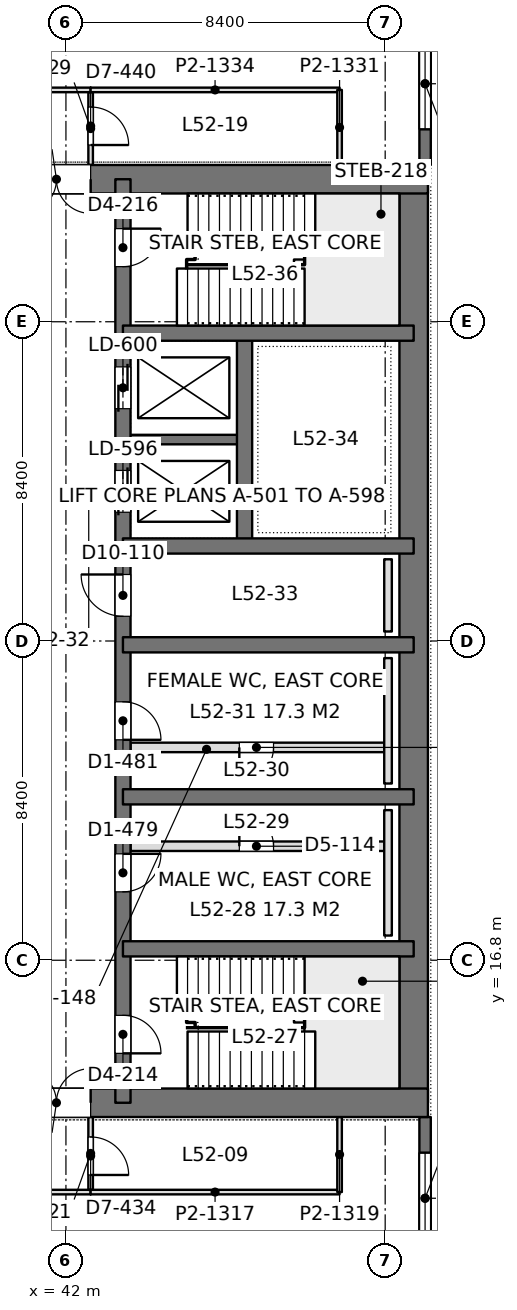
"""IFC4 building model, lengths in metres.
Left out: names, types, materials, properties, quantities, classifications, styles, units other than length and angle.
Written with IfcOpenShell. Run it as: python <this file> out.ifc"""

import sys

from ifc_helpers import new_model, si_unit, direction, frame, frame_2d, origin, place, context, subcontext, project, spatial, rectangle, extrude, element, fill, save


model = new_model("IFC4")
c1 = context("Model", 3, precision=1e-05, world=origin(), true_north=direction((0.0, 1.0)))
c2 = subcontext(c1, "Body", "Model", "MODEL_VIEW")
j1 = project(units=[si_unit("LENGTHUNIT", "METRE"), si_unit("PLANEANGLEUNIT", "RADIAN")], contexts=[c1])
p1 = place(None, origin())
s1 = spatial("IfcSite", under=j1, at=p1, CompositionType="ELEMENT")
p2 = place(p1, origin())
s2 = spatial("IfcBuilding", under=s1, at=p2, CompositionType="ELEMENT")
p3 = place(p2, frame((0.0, 0.0, 228.0)))
s3 = spatial("IfcBuildingStorey", under=s2, at=p3, CompositionType="ELEMENT", Elevation=228.0)
p4 = place(p3, frame((33.675, 13.05, 0.0), z_axis=(0.0, 0.0, 1.0), x_axis=(1.0, 0.0, 0.0)))
e1 = element("IfcWall", 1, at=p4, inside=s3, PredefinedType="SHEAR", context=c2, shape_type="SweptSolid", body=[
    extrude(rectangle(XDim=17.85, YDim=0.75, at=frame_2d((8.925, 0.0))), origin(), (0.0, 0.0, 1.0), 4.2),
])
p5 = place(p4, frame((7.175, 0.0, 0.0)))
e2 = element("IfcOpeningElement", 2, at=p5, cuts=e1, PredefinedType="OPENING", context=c2, shape_type="SweptSolid", body=[
    extrude(rectangle(XDim=1.8, YDim=2.4, at=frame_2d((0.9, 1.2))), frame((0.0, 0.385, 0.0), z_axis=(0.0, -1.0, 0.0), x_axis=(1.0, 0.0, 0.0)), (0.0, 0.0, 1.0), 0.77),
])
p6 = place(p3, frame((33.675, 37.35, 0.0), z_axis=(0.0, 0.0, 1.0), x_axis=(1.0, 0.0, 0.0)))
e3 = element("IfcWall", 3, at=p6, inside=s3, PredefinedType="SHEAR", context=c2, shape_type="SweptSolid", body=[
    extrude(rectangle(XDim=17.85, YDim=0.75, at=frame_2d((8.925, 0.0))), origin(), (0.0, 0.0, 1.0), 4.2),
])
p7 = place(p6, frame((7.175, 0.0, 0.0)))
e4 = element("IfcOpeningElement", 4, at=p7, cuts=e3, PredefinedType="OPENING", context=c2, shape_type="SweptSolid", body=[
    extrude(rectangle(XDim=1.8, YDim=2.4, at=frame_2d((0.9, 1.2))), frame((0.0, 0.385, 0.0), z_axis=(0.0, -1.0, 0.0), x_axis=(1.0, 0.0, 0.0)), (0.0, 0.0, 1.0), 0.77),
])
p8 = place(p3, frame((51.15, 13.05, 0.0), z_axis=(0.0, 0.0, 1.0), x_axis=(0.0, 1.0, 0.0)))
e5 = element("IfcWall", 5, at=p8, inside=s3, PredefinedType="SHEAR", context=c2, shape_type="SweptSolid", body=[
    extrude(rectangle(XDim=24.3, YDim=0.75, at=frame_2d((12.15, 0.0))), origin(), (0.0, 0.0, 1.0), 4.2),
])
p9 = place(p3, frame((43.5, 13.05, 0.0), z_axis=(0.0, 0.0, 1.0), x_axis=(0.0, 1.0, 0.0)))
e6 = element("IfcWall", 6, at=p9, inside=s3, PredefinedType="SHEAR", context=c2, shape_type="SweptSolid", body=[
    extrude(rectangle(XDim=24.3, YDim=0.4, at=frame_2d((12.15, 0.0))), origin(), (0.0, 0.0, 1.0), 4.2),
])
p10 = place(p9, frame((1.3, 0.0, 0.0)))
e7 = element("IfcOpeningElement", 7, at=p10, cuts=e6, PredefinedType="OPENING", context=c2, shape_type="SweptSolid", body=[
    extrude(rectangle(XDim=1.0, YDim=2.2, at=frame_2d((0.5, 1.1))), frame((0.0, 0.21, 0.0), z_axis=(0.0, -1.0, 0.0), x_axis=(1.0, 0.0, 0.0)), (0.0, 0.0, 1.0), 0.42),
])
p11 = place(p9, frame((22.0, 0.0, 0.0)))
e8 = element("IfcOpeningElement", 8, at=p11, cuts=e6, PredefinedType="OPENING", context=c2, shape_type="SweptSolid", body=[
    extrude(rectangle(XDim=1.0, YDim=2.2, at=frame_2d((0.5, 1.1))), frame((0.0, 0.21, 0.0), z_axis=(0.0, -1.0, 0.0), x_axis=(1.0, 0.0, 0.0)), (0.0, 0.0, 1.0), 0.42),
])
p12 = place(p9, frame((5.55, 0.0, 0.0)))
e9 = element("IfcOpeningElement", 9, at=p12, cuts=e6, PredefinedType="OPENING", context=c2, shape_type="SweptSolid", body=[
    extrude(rectangle(XDim=1.0, YDim=2.2, at=frame_2d((0.5, 1.1))), frame((0.0, 0.21, 0.0), z_axis=(0.0, -1.0, 0.0), x_axis=(1.0, 0.0, 0.0)), (0.0, 0.0, 1.0), 0.42),
])
p13 = place(p9, frame((9.55, 0.0, 0.0)))
e10 = element("IfcOpeningElement", 10, at=p13, cuts=e6, PredefinedType="OPENING", context=c2, shape_type="SweptSolid", body=[
    extrude(rectangle(XDim=1.0, YDim=2.2, at=frame_2d((0.5, 1.1))), frame((0.0, 0.21, 0.0), z_axis=(0.0, -1.0, 0.0), x_axis=(1.0, 0.0, 0.0)), (0.0, 0.0, 1.0), 0.42),
])
p14 = place(p9, frame((12.8, 0.0, 0.0)))
e11 = element("IfcOpeningElement", 11, at=p14, cuts=e6, PredefinedType="OPENING", context=c2, shape_type="SweptSolid", body=[
    extrude(rectangle(XDim=1.1, YDim=2.2, at=frame_2d((0.55, 1.1))), frame((0.0, 0.21, 0.0), z_axis=(0.0, -1.0, 0.0), x_axis=(1.0, 0.0, 0.0)), (0.0, 0.0, 1.0), 0.42),
])
p15 = place(p9, frame((15.538, 0.0, 0.0)))
e12 = element("IfcOpeningElement", 12, at=p15, cuts=e6, PredefinedType="OPENING", context=c2, shape_type="SweptSolid", body=[
    extrude(rectangle(XDim=1.1, YDim=2.2, at=frame_2d((0.55, 1.1))), frame((0.0, 0.21, 0.0), z_axis=(0.0, -1.0, 0.0), x_axis=(1.0, 0.0, 0.0)), (0.0, 0.0, 1.0), 0.42),
])
p16 = place(p9, frame((18.262, 0.0, 0.0)))
e13 = element("IfcOpeningElement", 13, at=p16, cuts=e6, PredefinedType="OPENING", context=c2, shape_type="SweptSolid", body=[
    extrude(rectangle(XDim=1.1, YDim=2.2, at=frame_2d((0.55, 1.1))), frame((0.0, 0.21, 0.0), z_axis=(0.0, -1.0, 0.0), x_axis=(1.0, 0.0, 0.0)), (0.0, 0.0, 1.0), 0.42),
])
for number, where, z_axis, x_axis in (
    (14, (51.15, 17.1, 0.0), (0.0, 0.0, 1.0), (-1.0, 0.0, 0.0)),
    (15, (51.15, 21.1, 0.0), (0.0, 0.0, 1.0), (-1.0, 0.0, 0.0)),
    (16, (51.15, 25.1, 0.0), (0.0, 0.0, 1.0), (-1.0, 0.0, 0.0)),
    (17, (51.15, 27.7, 0.0), (0.0, 0.0, 1.0), (-1.0, 0.0, 0.0)),
    (18, (51.15, 33.3, 0.0), (0.0, 0.0, 1.0), (-1.0, 0.0, 0.0)),
):
    element("IfcWall", number, at=place(p3, frame(where, z_axis=z_axis, x_axis=x_axis)), inside=s3, PredefinedType="SHEAR", context=c2, shape_type="SweptSolid", body=[
        extrude(rectangle(XDim=7.65, YDim=0.4, at=frame_2d((3.825, 0.0))), origin(), (0.0, 0.0, 1.0), 4.2),
    ])
p17 = place(p3, frame((46.7, 27.7, 0.0), z_axis=(0.0, 0.0, 1.0), x_axis=(0.0, 1.0, 0.0)))
e19 = element("IfcWall", 19, at=p17, inside=s3, PredefinedType="SHEAR", context=c2, shape_type="SweptSolid", body=[
    extrude(rectangle(XDim=5.6, YDim=0.4, at=frame_2d((2.8, 0.0))), origin(), (0.0, 0.0, 1.0), 4.2),
])
p18 = place(p3, frame((46.7, 30.5, 0.0), z_axis=(0.0, 0.0, 1.0), x_axis=(-1.0, 0.0, 0.0)))
e20 = element("IfcWall", 20, at=p18, inside=s3, PredefinedType="SHEAR", context=c2, shape_type="SweptSolid", body=[
    extrude(rectangle(XDim=3.2, YDim=0.25, at=frame_2d((1.6, 0.0))), origin(), (0.0, 0.0, 1.0), 4.2),
])
p19 = place(p3, frame((51.45, 42.0, 0.0), z_axis=(0.0, 0.0, 1.0), x_axis=(0.0, -1.0, 0.0)))
e21 = element("IfcWall", 21, at=p19, inside=s3, PredefinedType="SOLIDWALL", context=c2, shape_type="SweptSolid", body=[
    extrude(rectangle(XDim=4.275, YDim=0.3, at=frame_2d((2.137, 0.0))), origin(), (0.0, 0.0, 1.0), 4.05),
])
p20 = place(p19, frame((0.938, 0.0, 0.9)))
e22 = element("IfcOpeningElement", 22, at=p20, cuts=e21, PredefinedType="OPENING", context=c2, shape_type="SweptSolid", body=[
    extrude(rectangle(XDim=2.4, YDim=1.9, at=frame_2d((1.2, 0.95))), frame((0.0, 0.16, 0.0), z_axis=(0.0, -1.0, 0.0), x_axis=(1.0, 0.0, 0.0)), (0.0, 0.0, 1.0), 0.32),
])
p21 = place(p3, frame((51.45, 12.675, 0.0), z_axis=(0.0, 0.0, 1.0), x_axis=(0.0, -1.0, 0.0)))
e23 = element("IfcWall", 23, at=p21, inside=s3, PredefinedType="SOLIDWALL", context=c2, shape_type="SweptSolid", body=[
    extrude(rectangle(XDim=4.275, YDim=0.3, at=frame_2d((2.138, 0.0))), origin(), (0.0, 0.0, 1.0), 4.05),
])
p22 = place(p21, frame((0.938, 0.0, 0.9)))
e24 = element("IfcOpeningElement", 24, at=p22, cuts=e23, PredefinedType="OPENING", context=c2, shape_type="SweptSolid", body=[
    extrude(rectangle(XDim=2.4, YDim=1.9, at=frame_2d((1.2, 0.95))), frame((0.0, 0.16, 0.0), z_axis=(0.0, -1.0, 0.0), x_axis=(1.0, 0.0, 0.0)), (0.0, 0.0, 1.0), 0.32),
])
p23 = place(p3, frame((7.748, 10.7, 0.0), z_axis=(0.0, 0.0, 1.0), x_axis=(1.0, 0.0, 0.0)))
e25 = element("IfcWall", 25, at=p23, inside=s3, PredefinedType="PARTITIONING", context=c2, shape_type="SweptSolid", body=[
    extrude(rectangle(XDim=34.904, YDim=0.12, at=frame_2d((17.452, 0.0))), origin(), (0.0, 0.0, 1.0), 3.55),
])
p24 = place(p23, frame((10.735, 0.0, 0.0)))
e26 = element("IfcOpeningElement", 26, at=p24, cuts=e25, PredefinedType="OPENING", context=c2, shape_type="SweptSolid", body=[
    extrude(rectangle(XDim=1.8, YDim=2.2, at=frame_2d((0.9, 1.1))), frame((0.0, 0.07, 0.0), z_axis=(0.0, -1.0, 0.0), x_axis=(1.0, 0.0, 0.0)), (0.0, 0.0, 1.0), 0.14),
])
p25 = place(p23, frame((22.369, 0.0, 0.0)))
e27 = element("IfcOpeningElement", 27, at=p25, cuts=e25, PredefinedType="OPENING", context=c2, shape_type="SweptSolid", body=[
    extrude(rectangle(XDim=1.8, YDim=2.2, at=frame_2d((0.9, 1.1))), frame((0.0, 0.07, 0.0), z_axis=(0.0, -1.0, 0.0), x_axis=(1.0, 0.0, 0.0)), (0.0, 0.0, 1.0), 0.14),
])
p26 = place(p3, frame((42.65, 10.758, 0.0), z_axis=(0.0, 0.0, 1.0), x_axis=(0.0, 1.0, 0.0)))
e28 = element("IfcWall", 28, at=p26, inside=s3, PredefinedType="PARTITIONING", context=c2, shape_type="SweptSolid", body=[
    extrude(rectangle(XDim=1.918, YDim=0.12, at=frame_2d((0.959, 0.0))), origin(), (0.0, 0.0, 1.0), 4.05),
])
p27 = place(p26, frame((0.392, 0.0, 0.0)))
e29 = element("IfcOpeningElement", 29, at=p27, cuts=e28, PredefinedType="OPENING", context=c2, shape_type="SweptSolid", body=[
    extrude(rectangle(XDim=1.0, YDim=2.4, at=frame_2d((0.5, 1.2))), frame((0.0, 0.07, 0.0), z_axis=(0.0, -1.0, 0.0), x_axis=(1.0, 0.0, 0.0)), (0.0, 0.0, 1.0), 0.14),
])
p28 = place(p3, frame((42.648, 10.7, 0.0), z_axis=(0.0, 0.0, 1.0), x_axis=(1.0, 0.0, 0.0)))
e30 = element("IfcWall", 30, at=p28, inside=s3, PredefinedType="PARTITIONING", context=c2, shape_type="SweptSolid", body=[
    extrude(rectangle(XDim=6.552, YDim=0.12, at=frame_2d((3.276, 0.0))), origin(), (0.0, 0.0, 1.0), 4.05),
])
p29 = place(p3, frame((49.2, 10.7, 0.0), z_axis=(0.0, 0.0, 1.0), x_axis=(0.0, 1.0, 0.0)))
e31 = element("IfcWall", 31, at=p29, inside=s3, PredefinedType="PARTITIONING", context=c2, shape_type="SweptSolid", body=[
    extrude(rectangle(XDim=1.976, YDim=0.12, at=frame_2d((0.988, 0.0))), origin(), (0.0, 0.0, 1.0), 4.05),
])
p30 = place(p3, frame((7.748, 39.7, 0.0), z_axis=(0.0, 0.0, 1.0), x_axis=(1.0, 0.0, 0.0)))
e32 = element("IfcWall", 32, at=p30, inside=s3, PredefinedType="PARTITIONING", context=c2, shape_type="SweptSolid", body=[
    extrude(rectangle(XDim=34.904, YDim=0.12, at=frame_2d((17.452, 0.0))), origin(), (0.0, 0.0, 1.0), 3.55),
])
p31 = place(p30, frame((10.735, 0.0, 0.0)))
e33 = element("IfcOpeningElement", 33, at=p31, cuts=e32, PredefinedType="OPENING", context=c2, shape_type="SweptSolid", body=[
    extrude(rectangle(XDim=1.8, YDim=2.2, at=frame_2d((0.9, 1.1))), frame((0.0, 0.07, 0.0), z_axis=(0.0, -1.0, 0.0), x_axis=(1.0, 0.0, 0.0)), (0.0, 0.0, 1.0), 0.14),
])
p32 = place(p30, frame((22.369, 0.0, 0.0)))
e34 = element("IfcOpeningElement", 34, at=p32, cuts=e32, PredefinedType="OPENING", context=c2, shape_type="SweptSolid", body=[
    extrude(rectangle(XDim=1.8, YDim=2.2, at=frame_2d((0.9, 1.1))), frame((0.0, 0.07, 0.0), z_axis=(0.0, -1.0, 0.0), x_axis=(1.0, 0.0, 0.0)), (0.0, 0.0, 1.0), 0.14),
])
p33 = place(p3, frame((42.65, 37.724, 0.0), z_axis=(0.0, 0.0, 1.0), x_axis=(0.0, 1.0, 0.0)))
e35 = element("IfcWall", 35, at=p33, inside=s3, PredefinedType="PARTITIONING", context=c2, shape_type="SweptSolid", body=[
    extrude(rectangle(XDim=1.918, YDim=0.12, at=frame_2d((0.959, 0.0))), origin(), (0.0, 0.0, 1.0), 4.05),
])
p34 = place(p33, frame((0.526, 0.0, 0.0)))
e36 = element("IfcOpeningElement", 36, at=p34, cuts=e35, PredefinedType="OPENING", context=c2, shape_type="SweptSolid", body=[
    extrude(rectangle(XDim=1.0, YDim=2.4, at=frame_2d((0.5, 1.2))), frame((0.0, 0.07, 0.0), z_axis=(0.0, -1.0, 0.0), x_axis=(1.0, 0.0, 0.0)), (0.0, 0.0, 1.0), 0.14),
])
p35 = place(p3, frame((42.648, 39.7, 0.0), z_axis=(0.0, 0.0, 1.0), x_axis=(1.0, 0.0, 0.0)))
e37 = element("IfcWall", 37, at=p35, inside=s3, PredefinedType="PARTITIONING", context=c2, shape_type="SweptSolid", body=[
    extrude(rectangle(XDim=6.552, YDim=0.12, at=frame_2d((3.276, 0.0))), origin(), (0.0, 0.0, 1.0), 3.69),
])
p36 = place(p3, frame((49.2, 37.724, 0.0), z_axis=(0.0, 0.0, 1.0), x_axis=(0.0, 1.0, 0.0)))
e38 = element("IfcWall", 38, at=p36, inside=s3, PredefinedType="PARTITIONING", context=c2, shape_type="SweptSolid", body=[
    extrude(rectangle(XDim=1.976, YDim=0.12, at=frame_2d((0.988, 0.0))), origin(), (0.0, 0.0, 1.0), 4.05),
])
p37 = place(p3, frame((43.7, 22.4, 0.0), z_axis=(0.0, 0.0, 1.0), x_axis=(1.0, 0.0, 0.0)))
e39 = element("IfcWall", 39, at=p37, inside=s3, PredefinedType="PARTITIONING", context=c2, shape_type="SweptSolid", body=[
    extrude(rectangle(XDim=6.675, YDim=0.25, at=frame_2d((3.337, 0.0))), origin(), (0.0, 0.0, 1.0), 4.0),
])
p38 = place(p37, frame((2.863, 0.0, 0.0)))
e40 = element("IfcOpeningElement", 40, at=p38, cuts=e39, PredefinedType="OPENING", context=c2, shape_type="SweptSolid", body=[
    extrude(rectangle(XDim=0.9, YDim=2.2, at=frame_2d((0.45, 1.1))), frame((0.0, 0.135, 0.0), z_axis=(0.0, -1.0, 0.0), x_axis=(1.0, 0.0, 0.0)), (0.0, 0.0, 1.0), 0.27),
])
p39 = place(p3, frame((43.7, 19.8, 0.0), z_axis=(0.0, 0.0, 1.0), x_axis=(1.0, 0.0, 0.0)))
e41 = element("IfcWall", 41, at=p39, inside=s3, PredefinedType="PARTITIONING", context=c2, shape_type="SweptSolid", body=[
    extrude(rectangle(XDim=6.675, YDim=0.25, at=frame_2d((3.337, 0.0))), origin(), (0.0, 0.0, 1.0), 4.0),
])
p40 = place(p39, frame((2.863, 0.0, 0.0)))
e42 = element("IfcOpeningElement", 42, at=p40, cuts=e41, PredefinedType="OPENING", context=c2, shape_type="SweptSolid", body=[
    extrude(rectangle(XDim=0.9, YDim=2.2, at=frame_2d((0.45, 1.1))), frame((0.0, 0.135, 0.0), z_axis=(0.0, -1.0, 0.0), x_axis=(1.0, 0.0, 0.0)), (0.0, 0.0, 1.0), 0.27),
])
for number, where, z_axis, x_axis in (
    (43, (50.475, 17.45, 0.0), (0.0, 0.0, 1.0), (0.0, 1.0, 0.0)),
    (44, (50.475, 21.45, 0.0), (0.0, 0.0, 1.0), (0.0, 1.0, 0.0)),
):
    element("IfcWall", number, at=place(p3, frame(where, z_axis=z_axis, x_axis=x_axis)), inside=s3, PredefinedType="PLUMBINGWALL", context=c2, shape_type="SweptSolid", body=[
        extrude(rectangle(XDim=3.3, YDim=0.2, at=frame_2d((1.65, 0.0))), origin(), (0.0, 0.0, 1.0), 1.2),
    ])
p41 = place(p3, frame((50.475, 25.45, 0.0), z_axis=(0.0, 0.0, 1.0), x_axis=(0.0, 1.0, 0.0)))
e45 = element("IfcWall", 45, at=p41, inside=s3, PredefinedType="PLUMBINGWALL", context=c2, shape_type="SweptSolid", body=[
    extrude(rectangle(XDim=1.9, YDim=0.2, at=frame_2d((0.95, 0.0))), origin(), (0.0, 0.0, 1.0), 1.2),
])
p42 = place(p20, origin())
e46 = element("IfcWindow", 46, at=p42, inside=s3, PartitioningType="SINGLE_PANEL", PredefinedType="WINDOW", context=c2, shape_type="SweptSolid", body=[
    extrude(rectangle(XDim=2.4, YDim=1.9, at=frame_2d((1.2, 0.95))), frame((0.0, 0.03, 0.0), z_axis=(0.0, -1.0, 0.0), x_axis=(1.0, 0.0, 0.0)), (0.0, 0.0, 1.0), 0.06),
])
fill(e22, e46)
p43 = place(p22, origin())
e47 = element("IfcWindow", 47, at=p43, inside=s3, PartitioningType="SINGLE_PANEL", PredefinedType="WINDOW", context=c2, shape_type="SweptSolid", body=[
    extrude(rectangle(XDim=2.4, YDim=1.9, at=frame_2d((1.2, 0.95))), frame((0.0, 0.03, 0.0), z_axis=(0.0, -1.0, 0.0), x_axis=(1.0, 0.0, 0.0)), (0.0, 0.0, 1.0), 0.06),
])
fill(e24, e47)
p44 = place(p5, origin())
e48 = element("IfcDoor", 48, at=p44, inside=s3, OperationType="DOUBLE_DOOR_SINGLE_SWING", PredefinedType="DOOR", context=c2, shape_type="SweptSolid", body=[
    extrude(rectangle(XDim=1.8, YDim=2.4, at=frame_2d((0.9, 1.2))), frame((0.0, 0.025, 0.0), z_axis=(0.0, -1.0, 0.0), x_axis=(1.0, 0.0, 0.0)), (0.0, 0.0, 1.0), 0.05),
])
fill(e2, e48)
p45 = place(p7, frame((1.8, 0.0, 0.0), z_axis=(0.0, 0.0, 1.0), x_axis=(-1.0, 0.0, 0.0)))
e49 = element("IfcDoor", 49, at=p45, inside=s3, OperationType="DOUBLE_DOOR_SINGLE_SWING", PredefinedType="DOOR", context=c2, shape_type="SweptSolid", body=[
    extrude(rectangle(XDim=1.8, YDim=2.4, at=frame_2d((0.9, 1.2))), frame((0.0, 0.025, 0.0), z_axis=(0.0, -1.0, 0.0), x_axis=(1.0, 0.0, 0.0)), (0.0, 0.0, 1.0), 0.05),
])
fill(e4, e49)
p46 = place(p10, frame((1.0, 0.0, 0.0), z_axis=(0.0, 0.0, 1.0), x_axis=(-1.0, 0.0, 0.0)))
e50 = element("IfcDoor", 50, at=p46, inside=s3, OperationType="SINGLE_SWING_RIGHT", PredefinedType="DOOR", context=c2, shape_type="SweptSolid", body=[
    extrude(rectangle(XDim=1.0, YDim=2.2, at=frame_2d((0.5, 1.1))), frame((0.0, 0.025, 0.0), z_axis=(0.0, -1.0, 0.0), x_axis=(1.0, 0.0, 0.0)), (0.0, 0.0, 1.0), 0.05),
])
fill(e7, e50)
p47 = place(p11, frame((1.0, 0.0, 0.0), z_axis=(0.0, 0.0, 1.0), x_axis=(-1.0, 0.0, 0.0)))
e51 = element("IfcDoor", 51, at=p47, inside=s3, OperationType="SINGLE_SWING_LEFT", PredefinedType="DOOR", context=c2, shape_type="SweptSolid", body=[
    extrude(rectangle(XDim=1.0, YDim=2.2, at=frame_2d((0.5, 1.1))), frame((0.0, 0.025, 0.0), z_axis=(0.0, -1.0, 0.0), x_axis=(1.0, 0.0, 0.0)), (0.0, 0.0, 1.0), 0.05),
])
fill(e8, e51)
p48 = place(p12, frame((1.0, 0.0, 0.0), z_axis=(0.0, 0.0, 1.0), x_axis=(-1.0, 0.0, 0.0)))
e52 = element("IfcDoor", 52, at=p48, inside=s3, OperationType="SINGLE_SWING_LEFT", PredefinedType="DOOR", context=c2, shape_type="SweptSolid", body=[
    extrude(rectangle(XDim=1.0, YDim=2.2, at=frame_2d((0.5, 1.1))), frame((0.0, 0.025, 0.0), z_axis=(0.0, -1.0, 0.0), x_axis=(1.0, 0.0, 0.0)), (0.0, 0.0, 1.0), 0.05),
])
fill(e9, e52)
p49 = place(p13, frame((1.0, 0.0, 0.0), z_axis=(0.0, 0.0, 1.0), x_axis=(-1.0, 0.0, 0.0)))
e53 = element("IfcDoor", 53, at=p49, inside=s3, OperationType="SINGLE_SWING_RIGHT", PredefinedType="DOOR", context=c2, shape_type="SweptSolid", body=[
    extrude(rectangle(XDim=1.0, YDim=2.2, at=frame_2d((0.5, 1.1))), frame((0.0, 0.025, 0.0), z_axis=(0.0, -1.0, 0.0), x_axis=(1.0, 0.0, 0.0)), (0.0, 0.0, 1.0), 0.05),
])
fill(e10, e53)
p50 = place(p14, origin())
e54 = element("IfcDoor", 54, at=p50, inside=s3, OperationType="SINGLE_SWING_RIGHT", PredefinedType="DOOR", context=c2, shape_type="SweptSolid", body=[
    extrude(rectangle(XDim=1.1, YDim=2.2, at=frame_2d((0.55, 1.1))), frame((0.0, 0.025, 0.0), z_axis=(0.0, -1.0, 0.0), x_axis=(1.0, 0.0, 0.0)), (0.0, 0.0, 1.0), 0.05),
])
fill(e11, e54)
p51 = place(p15, origin())
e55 = element("IfcDoor", 55, at=p51, inside=s3, OperationType="DOUBLE_DOOR_SLIDING", PredefinedType="DOOR", context=c2, shape_type="SweptSolid", body=[
    extrude(rectangle(XDim=1.1, YDim=2.2, at=frame_2d((0.55, 1.1))), frame((0.0, 0.025, 0.0), z_axis=(0.0, -1.0, 0.0), x_axis=(1.0, 0.0, 0.0)), (0.0, 0.0, 1.0), 0.05),
])
fill(e12, e55)
p52 = place(p16, origin())
e56 = element("IfcDoor", 56, at=p52, inside=s3, OperationType="DOUBLE_DOOR_SLIDING", PredefinedType="DOOR", context=c2, shape_type="SweptSolid", body=[
    extrude(rectangle(XDim=1.1, YDim=2.2, at=frame_2d((0.55, 1.1))), frame((0.0, 0.025, 0.0), z_axis=(0.0, -1.0, 0.0), x_axis=(1.0, 0.0, 0.0)), (0.0, 0.0, 1.0), 0.05),
])
fill(e13, e56)
p53 = place(p27, frame((1.0, 0.0, 0.0), z_axis=(0.0, 0.0, 1.0), x_axis=(-1.0, 0.0, 0.0)))
e57 = element("IfcDoor", 57, at=p53, inside=s3, OperationType="SINGLE_SWING_RIGHT", PredefinedType="DOOR", context=c2, shape_type="SweptSolid", body=[
    extrude(rectangle(XDim=1.0, YDim=2.4, at=frame_2d((0.5, 1.2))), frame((0.0, 0.025, 0.0), z_axis=(0.0, -1.0, 0.0), x_axis=(1.0, 0.0, 0.0)), (0.0, 0.0, 1.0), 0.05),
])
fill(e29, e57)
p54 = place(p34, frame((1.0, 0.0, 0.0), z_axis=(0.0, 0.0, 1.0), x_axis=(-1.0, 0.0, 0.0)))
e58 = element("IfcDoor", 58, at=p54, inside=s3, OperationType="SINGLE_SWING_RIGHT", PredefinedType="DOOR", context=c2, shape_type="SweptSolid", body=[
    extrude(rectangle(XDim=1.0, YDim=2.4, at=frame_2d((0.5, 1.2))), frame((0.0, 0.025, 0.0), z_axis=(0.0, -1.0, 0.0), x_axis=(1.0, 0.0, 0.0)), (0.0, 0.0, 1.0), 0.05),
])
fill(e36, e58)
p55 = place(p38, frame((0.9, 0.0, 0.0), z_axis=(0.0, 0.0, 1.0), x_axis=(-1.0, 0.0, 0.0)))
e59 = element("IfcDoor", 59, at=p55, inside=s3, OperationType="SINGLE_SWING_RIGHT", PredefinedType="DOOR", context=c2, shape_type="SweptSolid", body=[
    extrude(rectangle(XDim=0.9, YDim=2.2, at=frame_2d((0.45, 1.1))), frame((0.0, 0.025, 0.0), z_axis=(0.0, -1.0, 0.0), x_axis=(1.0, 0.0, 0.0)), (0.0, 0.0, 1.0), 0.05),
])
fill(e40, e59)
p56 = place(p40, origin())
e60 = element("IfcDoor", 60, at=p56, inside=s3, OperationType="SINGLE_SWING_LEFT", PredefinedType="DOOR", context=c2, shape_type="SweptSolid", body=[
    extrude(rectangle(XDim=0.9, YDim=2.2, at=frame_2d((0.45, 1.1))), frame((0.0, 0.025, 0.0), z_axis=(0.0, -1.0, 0.0), x_axis=(1.0, 0.0, 0.0)), (0.0, 0.0, 1.0), 0.05),
])
fill(e42, e60)
save(model, sys.argv[1])
